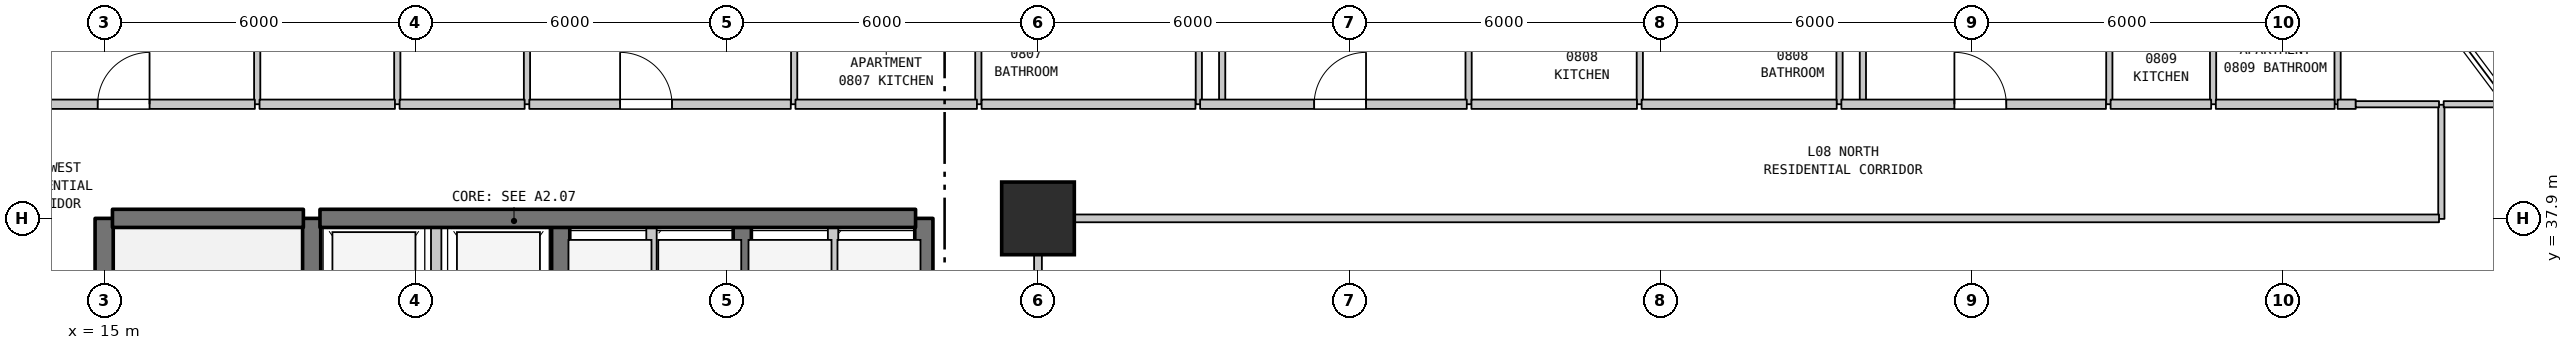
"""IFC4 building model, lengths in metres.
Left out: names, types, materials, properties, quantities, classifications, styles, units other than length and angle.
Written with IfcOpenShell. Run it as: python <this file> out.ifc"""

import sys

from ifc_helpers import new_model, si_unit, direction, frame, frame_2d, origin, origin_2d, place, context, subcontext, project, spatial, rectangle, extrude, element, fill, save


model = new_model("IFC4")
c1 = context("Model", 3, precision=1e-05, world=origin(), true_north=direction((0.0, 1.0)))
c2 = subcontext(c1, "Body", "Model", "MODEL_VIEW")
j1 = project(units=[si_unit("LENGTHUNIT", "METRE"), si_unit("PLANEANGLEUNIT", "RADIAN")], contexts=[c1])
p1 = place(None, origin())
s1 = spatial("IfcSite", under=j1, at=p1, CompositionType="ELEMENT")
p2 = place(p1, origin())
s2 = spatial("IfcBuilding", under=s1, at=p2, CompositionType="ELEMENT")
p3 = place(p2, frame((0.0, 0.0, 38.8)))
s3 = spatial("IfcBuildingStorey", under=s2, at=p3, CompositionType="ELEMENT", Elevation=38.8)
p4 = place(p3, frame((33.0, 37.9, 0.0), z_axis=(0.0, 0.0, 1.0), x_axis=(1.0, 0.0, 0.0)))
e1 = element("IfcColumn", 1, at=p4, inside=s3, PredefinedType="COLUMN", context=c2, shape_type="SweptSolid", body=[
    extrude(rectangle(XDim=1.4, YDim=1.4, at=origin_2d()), origin(), (0.0, 0.0, 1.0), 3.7),
])
p5 = place(p3, frame((15.0, 31.1, 0.0), z_axis=(0.0, 0.0, 1.0), x_axis=(0.0, 1.0, 0.0)))
e2 = element("IfcWall", 2, at=p5, inside=s3, PredefinedType="SHEAR", context=c2, shape_type="SweptSolid", body=[
    extrude(rectangle(XDim=6.8, YDim=0.35, at=frame_2d((3.4, 0.0))), origin(), (0.0, 0.0, 1.0), 3.385),
])
p6 = place(p3, frame((17.95, 40.1, 0.0), z_axis=(0.0, 0.0, 1.0), x_axis=(0.0, 1.0, 0.0)))
e3 = element("IfcWall", 3, at=p6, inside=s3, PredefinedType="PARTITIONING", context=c2, shape_type="SweptSolid", body=[
    extrude(rectangle(XDim=3.2, YDim=0.12, at=frame_2d((1.6, 0.0))), origin(), (0.0, 0.0, 1.0), 3.385),
])
p7 = place(p3, frame((19.0, 35.0, 0.0), z_axis=(0.0, 0.0, 1.0), x_axis=(0.0, 1.0, 0.0)))
e4 = element("IfcWall", 4, at=p7, inside=s3, PredefinedType="SHEAR", context=c2, shape_type="SweptSolid", body=[
    extrude(rectangle(XDim=2.9, YDim=0.35, at=frame_2d((1.45, 0.0))), origin(), (0.0, 0.0, 1.0), 3.385),
])
p8 = place(p3, frame((20.65, 40.1, 0.0), z_axis=(0.0, 0.0, 1.0), x_axis=(0.0, 1.0, 0.0)))
e5 = element("IfcWall", 5, at=p8, inside=s3, PredefinedType="PARTITIONING", context=c2, shape_type="SweptSolid", body=[
    extrude(rectangle(XDim=3.2, YDim=0.12, at=frame_2d((1.6, 0.0))), origin(), (0.0, 0.0, 1.0), 3.385),
])
p9 = place(p8, frame((1.15, 0.0, 0.0)))
e6 = element("IfcOpeningElement", 6, at=p9, cuts=e5, PredefinedType="OPENING", context=c2, shape_type="SweptSolid", body=[
    extrude(rectangle(XDim=0.9, YDim=2.15, at=frame_2d((0.45, 1.075))), frame((0.0, 0.07, 0.0), z_axis=(0.0, -1.0, 0.0), x_axis=(1.0, 0.0, 0.0)), (0.0, 0.0, 1.0), 0.14),
])
p10 = place(p3, frame((21.4, 35.0, 0.0), z_axis=(0.0, 0.0, 1.0), x_axis=(0.0, 1.0, 0.0)))
e7 = element("IfcWall", 7, at=p10, inside=s3, PredefinedType="STANDARD", context=c2, shape_type="SweptSolid", body=[
    extrude(rectangle(XDim=2.9, YDim=0.2, at=frame_2d((1.45, 0.0))), origin(), (0.0, 0.0, 1.0), 3.385),
])
p11 = place(p3, frame((23.15, 40.1, 0.0), z_axis=(0.0, 0.0, 1.0), x_axis=(0.0, 1.0, 0.0)))
e8 = element("IfcWall", 8, at=p11, inside=s3, PredefinedType="PARTITIONING", context=c2, shape_type="SweptSolid", body=[
    extrude(rectangle(XDim=2.05, YDim=0.12, at=frame_2d((1.025, 0.0))), origin(), (0.0, 0.0, 1.0), 3.385),
])
p12 = place(p3, frame((23.8, 35.0, 0.0), z_axis=(0.0, 0.0, 1.0), x_axis=(0.0, 1.0, 0.0)))
e9 = element("IfcWall", 9, at=p12, inside=s3, PredefinedType="SHEAR", context=c2, shape_type="SweptSolid", body=[
    extrude(rectangle(XDim=2.9, YDim=0.35, at=frame_2d((1.45, 0.0))), origin(), (0.0, 0.0, 1.0), 3.385),
])
p13 = place(p3, frame((25.55, 35.0, 0.0), z_axis=(0.0, 0.0, 1.0), x_axis=(0.0, 1.0, 0.0)))
e10 = element("IfcWall", 10, at=p13, inside=s3, PredefinedType="STANDARD", context=c2, shape_type="SweptSolid", body=[
    extrude(rectangle(XDim=2.9, YDim=0.2, at=frame_2d((1.45, 0.0))), origin(), (0.0, 0.0, 1.0), 3.385),
])
p14 = place(p3, frame((27.3, 35.0, 0.0), z_axis=(0.0, 0.0, 1.0), x_axis=(0.0, 1.0, 0.0)))
e11 = element("IfcWall", 11, at=p14, inside=s3, PredefinedType="SHEAR", context=c2, shape_type="SweptSolid", body=[
    extrude(rectangle(XDim=2.9, YDim=0.35, at=frame_2d((1.45, 0.0))), origin(), (0.0, 0.0, 1.0), 3.385),
])
p15 = place(p3, frame((28.3, 40.1, 0.0), z_axis=(0.0, 0.0, 1.0), x_axis=(0.0, 1.0, 0.0)))
e12 = element("IfcWall", 12, at=p15, inside=s3, PredefinedType="PARTITIONING", context=c2, shape_type="SweptSolid", body=[
    extrude(rectangle(XDim=2.3, YDim=0.12, at=frame_2d((1.15, 0.0))), origin(), (0.0, 0.0, 1.0), 3.385),
])
p16 = place(p3, frame((29.05, 35.0, 0.0), z_axis=(0.0, 0.0, 1.0), x_axis=(0.0, 1.0, 0.0)))
e13 = element("IfcWall", 13, at=p16, inside=s3, PredefinedType="STANDARD", context=c2, shape_type="SweptSolid", body=[
    extrude(rectangle(XDim=2.9, YDim=0.2, at=frame_2d((1.45, 0.0))), origin(), (0.0, 0.0, 1.0), 3.385),
])
p17 = place(p3, frame((30.8, 35.0, 0.0), z_axis=(0.0, 0.0, 1.0), x_axis=(0.0, 1.0, 0.0)))
e14 = element("IfcWall", 14, at=p17, inside=s3, PredefinedType="SHEAR", context=c2, shape_type="SweptSolid", body=[
    extrude(rectangle(XDim=2.9, YDim=0.35, at=frame_2d((1.45, 0.0))), origin(), (0.0, 0.0, 1.0), 3.385),
])
p18 = place(p3, frame((31.85, 40.1, 0.0), z_axis=(0.0, 0.0, 1.0), x_axis=(0.0, 1.0, 0.0)))
e15 = element("IfcWall", 15, at=p18, inside=s3, PredefinedType="PARTITIONING", context=c2, shape_type="SweptSolid", body=[
    extrude(rectangle(XDim=2.3, YDim=0.12, at=frame_2d((1.15, 0.0))), origin(), (0.0, 0.0, 1.0), 3.385),
])
p19 = place(p3, frame((33.0, 27.91, 0.0), z_axis=(0.0, 0.0, 1.0), x_axis=(0.0, 1.0, 0.0)))
e16 = element("IfcWall", 16, at=p19, inside=s3, PredefinedType="STANDARD", context=c2, shape_type="SweptSolid", body=[
    extrude(rectangle(XDim=9.98, YDim=0.15, at=frame_2d((4.99, 0.0))), origin(), (0.0, 0.0, 1.0), 2.885),
])
p20 = place(p3, frame((36.1, 40.1, 0.0), z_axis=(0.0, 0.0, 1.0), x_axis=(0.0, 1.0, 0.0)))
e17 = element("IfcWall", 17, at=p20, inside=s3, PredefinedType="PARTITIONING", context=c2, shape_type="SweptSolid", body=[
    extrude(rectangle(XDim=2.3, YDim=0.12, at=frame_2d((1.15, 0.0))), origin(), (0.0, 0.0, 1.0), 3.385),
])
p21 = place(p3, frame((36.55, 40.1, 0.0), z_axis=(0.0, 0.0, 1.0), x_axis=(0.0, 1.0, 0.0)))
e18 = element("IfcWall", 18, at=p21, inside=s3, PredefinedType="PARTITIONING", context=c2, shape_type="SweptSolid", body=[
    extrude(rectangle(XDim=13.79, YDim=0.12, at=frame_2d((6.895, 0.0))), origin(), (0.0, 0.0, 1.0), 3.385),
])
for number, where, z_axis, x_axis in (
    (19, (41.3, 40.1, 0.0), (0.0, 0.0, 1.0), (0.0, 1.0, 0.0)),
    (20, (44.6, 40.1, 0.0), (0.0, 0.0, 1.0), (0.0, 1.0, 0.0)),
    (21, (48.45, 40.1, 0.0), (0.0, 0.0, 1.0), (0.0, 1.0, 0.0)),
):
    element("IfcWall", number, at=place(p3, frame(where, z_axis=z_axis, x_axis=x_axis)), inside=s3, PredefinedType="PARTITIONING", context=c2, shape_type="SweptSolid", body=[
        extrude(rectangle(XDim=2.3, YDim=0.12, at=frame_2d((1.15, 0.0))), origin(), (0.0, 0.0, 1.0), 3.385),
    ])
p22 = place(p3, frame((48.9, 40.1, 0.0), z_axis=(0.0, 0.0, 1.0), x_axis=(0.0, 1.0, 0.0)))
e22 = element("IfcWall", 22, at=p22, inside=s3, PredefinedType="PARTITIONING", context=c2, shape_type="SweptSolid", body=[
    extrude(rectangle(XDim=13.79, YDim=0.12, at=frame_2d((6.895, 0.0))), origin(), (0.0, 0.0, 1.0), 3.385),
])
for number, where, z_axis, x_axis in (
    (23, (53.65, 40.1, 0.0), (0.0, 0.0, 1.0), (0.0, 1.0, 0.0)),
    (24, (55.65, 40.1, 0.0), (0.0, 0.0, 1.0), (0.0, 1.0, 0.0)),
    (25, (58.05, 40.1, 0.0), (0.0, 0.0, 1.0), (0.0, 1.0, 0.0)),
):
    element("IfcWall", number, at=place(p3, frame(where, z_axis=z_axis, x_axis=x_axis)), inside=s3, PredefinedType="PARTITIONING", context=c2, shape_type="SweptSolid", body=[
        extrude(rectangle(XDim=2.3, YDim=0.12, at=frame_2d((1.15, 0.0))), origin(), (0.0, 0.0, 1.0), 3.385),
    ])
p23 = place(p3, frame((60.05, 37.89, 0.0), z_axis=(0.0, 0.0, 1.0), x_axis=(0.0, 1.0, 0.0)))
e26 = element("IfcWall", 26, at=p23, inside=s3, PredefinedType="PARTITIONING", context=c2, shape_type="SweptSolid", body=[
    extrude(rectangle(XDim=2.2, YDim=0.12, at=frame_2d((1.1, 0.0))), origin(), (0.0, 0.0, 1.0), 3.385),
])
p24 = place(p3, frame((15.16, 37.9, 0.0), z_axis=(0.0, 0.0, 1.0), x_axis=(1.0, 0.0, 0.0)))
e27 = element("IfcWall", 27, at=p24, inside=s3, PredefinedType="SHEAR", context=c2, shape_type="SweptSolid", body=[
    extrude(rectangle(XDim=3.68, YDim=0.35, at=frame_2d((1.84, 0.0))), origin(), (0.0, 0.0, 1.0), 3.385),
])
p25 = place(p3, frame((19.16, 37.9, 0.0), z_axis=(0.0, 0.0, 1.0), x_axis=(1.0, 0.0, 0.0)))
e28 = element("IfcWall", 28, at=p25, inside=s3, PredefinedType="SHEAR", context=c2, shape_type="SweptSolid", body=[
    extrude(rectangle(XDim=11.48, YDim=0.35, at=frame_2d((5.74, 0.0))), origin(), (0.0, 0.0, 1.0), 3.385),
])
p26 = place(p3, frame((33.07, 37.9, 0.0), z_axis=(0.0, 0.0, 1.0), x_axis=(1.0, 0.0, 0.0)))
e29 = element("IfcWall", 29, at=p26, inside=s3, PredefinedType="STANDARD", context=c2, shape_type="SweptSolid", body=[
    extrude(rectangle(XDim=26.935, YDim=0.15, at=frame_2d((13.467, 0.0))), origin(), (0.0, 0.0, 1.0), 3.385),
])
p27 = place(p3, frame((12.875, 40.1, 0.0), z_axis=(0.0, 0.0, 1.0), x_axis=(1.0, 0.0, 0.0)))
e30 = element("IfcWall", 30, at=p27, inside=s3, PredefinedType="STANDARD", context=c2, shape_type="SweptSolid", body=[
    extrude(rectangle(XDim=5.03, YDim=0.18, at=frame_2d((2.515, 0.0))), origin(), (0.0, 0.0, 1.0), 3.385),
])
p28 = place(p27, frame((2.0, 0.0, 0.0)))
e31 = element("IfcOpeningElement", 31, at=p28, cuts=e30, PredefinedType="OPENING", context=c2, shape_type="SweptSolid", body=[
    extrude(rectangle(XDim=1.0, YDim=2.15, at=frame_2d((0.5, 1.075))), frame((0.0, 0.1, 0.0), z_axis=(0.0, -1.0, 0.0), x_axis=(1.0, 0.0, 0.0)), (0.0, 0.0, 1.0), 0.2),
])
p29 = place(p3, frame((17.995, 40.1, 0.0), z_axis=(0.0, 0.0, 1.0), x_axis=(1.0, 0.0, 0.0)))
e32 = element("IfcWall", 32, at=p29, inside=s3, PredefinedType="STANDARD", context=c2, shape_type="SweptSolid", body=[
    extrude(rectangle(XDim=2.61, YDim=0.18, at=frame_2d((1.305, 0.0))), origin(), (0.0, 0.0, 1.0), 3.385),
])
p30 = place(p3, frame((20.695, 40.1, 0.0), z_axis=(0.0, 0.0, 1.0), x_axis=(1.0, 0.0, 0.0)))
e33 = element("IfcWall", 33, at=p30, inside=s3, PredefinedType="STANDARD", context=c2, shape_type="SweptSolid", body=[
    extrude(rectangle(XDim=2.41, YDim=0.18, at=frame_2d((1.205, 0.0))), origin(), (0.0, 0.0, 1.0), 3.385),
])
p31 = place(p3, frame((23.195, 40.1, 0.0), z_axis=(0.0, 0.0, 1.0), x_axis=(1.0, 0.0, 0.0)))
e34 = element("IfcWall", 34, at=p31, inside=s3, PredefinedType="STANDARD", context=c2, shape_type="SweptSolid", body=[
    extrude(rectangle(XDim=5.04, YDim=0.18, at=frame_2d((2.52, 0.0))), origin(), (0.0, 0.0, 1.0), 3.385),
])
p32 = place(p31, frame((1.75, 0.0, 0.0)))
e35 = element("IfcOpeningElement", 35, at=p32, cuts=e34, PredefinedType="OPENING", context=c2, shape_type="SweptSolid", body=[
    extrude(rectangle(XDim=1.0, YDim=2.15, at=frame_2d((0.5, 1.075))), frame((0.0, 0.1, 0.0), z_axis=(0.0, -1.0, 0.0), x_axis=(1.0, 0.0, 0.0)), (0.0, 0.0, 1.0), 0.2),
])
p33 = place(p3, frame((28.325, 40.1, 0.0), z_axis=(0.0, 0.0, 1.0), x_axis=(1.0, 0.0, 0.0)))
e36 = element("IfcWall", 36, at=p33, inside=s3, PredefinedType="STANDARD", context=c2, shape_type="SweptSolid", body=[
    extrude(rectangle(XDim=3.498, YDim=0.18, at=frame_2d((1.749, 0.0))), origin(), (0.0, 0.0, 1.0), 3.385),
])
p34 = place(p3, frame((31.913, 40.1, 0.0), z_axis=(0.0, 0.0, 1.0), x_axis=(1.0, 0.0, 0.0)))
e37 = element("IfcWall", 37, at=p34, inside=s3, PredefinedType="STANDARD", context=c2, shape_type="SweptSolid", body=[
    extrude(rectangle(XDim=4.122, YDim=0.18, at=frame_2d((2.061, 0.0))), origin(), (0.0, 0.0, 1.0), 3.385),
])
p35 = place(p3, frame((36.125, 40.1, 0.0), z_axis=(0.0, 0.0, 1.0), x_axis=(1.0, 0.0, 0.0)))
e38 = element("IfcWall", 38, at=p35, inside=s3, PredefinedType="STANDARD", context=c2, shape_type="SweptSolid", body=[
    extrude(rectangle(XDim=5.14, YDim=0.18, at=frame_2d((2.57, 0.0))), origin(), (0.0, 0.0, 1.0), 3.385),
])
p36 = place(p35, frame((2.198, 0.0, 0.0)))
e39 = element("IfcOpeningElement", 39, at=p36, cuts=e38, PredefinedType="OPENING", context=c2, shape_type="SweptSolid", body=[
    extrude(rectangle(XDim=1.0, YDim=2.15, at=frame_2d((0.5, 1.075))), frame((0.0, 0.1, 0.0), z_axis=(0.0, -1.0, 0.0), x_axis=(1.0, 0.0, 0.0)), (0.0, 0.0, 1.0), 0.2),
])
p37 = place(p3, frame((41.355, 40.1, 0.0), z_axis=(0.0, 0.0, 1.0), x_axis=(1.0, 0.0, 0.0)))
e40 = element("IfcWall", 40, at=p37, inside=s3, PredefinedType="STANDARD", context=c2, shape_type="SweptSolid", body=[
    extrude(rectangle(XDim=3.19, YDim=0.18, at=frame_2d((1.595, 0.0))), origin(), (0.0, 0.0, 1.0), 3.385),
])
p38 = place(p3, frame((44.635, 40.1, 0.0), z_axis=(0.0, 0.0, 1.0), x_axis=(1.0, 0.0, 0.0)))
e41 = element("IfcWall", 41, at=p38, inside=s3, PredefinedType="STANDARD", context=c2, shape_type="SweptSolid", body=[
    extrude(rectangle(XDim=3.76, YDim=0.18, at=frame_2d((1.88, 0.0))), origin(), (0.0, 0.0, 1.0), 3.385),
])
p39 = place(p3, frame((48.485, 40.1, 0.0), z_axis=(0.0, 0.0, 1.0), x_axis=(1.0, 0.0, 0.0)))
e42 = element("IfcWall", 42, at=p39, inside=s3, PredefinedType="STANDARD", context=c2, shape_type="SweptSolid", body=[
    extrude(rectangle(XDim=5.1, YDim=0.18, at=frame_2d((2.55, 0.0))), origin(), (0.0, 0.0, 1.0), 3.385),
])
p40 = place(p39, frame((2.179, 0.0, 0.0)))
e43 = element("IfcOpeningElement", 43, at=p40, cuts=e42, PredefinedType="OPENING", context=c2, shape_type="SweptSolid", body=[
    extrude(rectangle(XDim=1.0, YDim=2.15, at=frame_2d((0.5, 1.075))), frame((0.0, 0.1, 0.0), z_axis=(0.0, -1.0, 0.0), x_axis=(1.0, 0.0, 0.0)), (0.0, 0.0, 1.0), 0.2),
])
p41 = place(p3, frame((53.675, 40.1, 0.0), z_axis=(0.0, 0.0, 1.0), x_axis=(1.0, 0.0, 0.0)))
e44 = element("IfcWall", 44, at=p41, inside=s3, PredefinedType="STANDARD", context=c2, shape_type="SweptSolid", body=[
    extrude(rectangle(XDim=1.938, YDim=0.18, at=frame_2d((0.969, 0.0))), origin(), (0.0, 0.0, 1.0), 3.385),
])
p42 = place(p3, frame((55.703, 40.1, 0.0), z_axis=(0.0, 0.0, 1.0), x_axis=(1.0, 0.0, 0.0)))
e45 = element("IfcWall", 45, at=p42, inside=s3, PredefinedType="STANDARD", context=c2, shape_type="SweptSolid", body=[
    extrude(rectangle(XDim=2.29, YDim=0.18, at=frame_2d((1.145, 0.0))), origin(), (0.0, 0.0, 1.0), 3.385),
])
p43 = place(p3, frame((58.05, 40.1, 0.0), z_axis=(0.0, 0.0, 1.0), x_axis=(1.0, 0.0, 0.0)))
e46 = element("IfcWall", 46, at=p43, inside=s3, PredefinedType="STANDARD", context=c2, shape_type="SweptSolid", body=[
    extrude(rectangle(XDim=0.35, YDim=0.18, at=frame_2d((0.175, 0.0))), origin(), (0.0, 0.0, 1.0), 3.385),
])
p44 = place(p3, frame((58.4, 40.1, 0.0), z_axis=(0.0, 0.0, 1.0), x_axis=(1.0, 0.0, 0.0)))
e47 = element("IfcWall", 47, at=p44, inside=s3, PredefinedType="PARTITIONING", context=c2, shape_type="SweptSolid", body=[
    extrude(rectangle(XDim=1.605, YDim=0.12, at=frame_2d((0.802, 0.0))), origin(), (0.0, 0.0, 1.0), 3.385),
])
p45 = place(p3, frame((60.095, 40.1, 0.0), z_axis=(0.0, 0.0, 1.0), x_axis=(1.0, 0.0, 0.0)))
e48 = element("IfcWall", 48, at=p45, inside=s3, PredefinedType="PARTITIONING", context=c2, shape_type="SweptSolid", body=[
    extrude(rectangle(XDim=1.245, YDim=0.12, at=frame_2d((0.623, 0.0))), origin(), (0.0, 0.0, 1.0), 3.385),
])
p46 = place(p28, origin())
e49 = element("IfcDoor", 49, at=p46, inside=s3, OperationType="SINGLE_SWING_RIGHT", PredefinedType="DOOR", context=c2, shape_type="SweptSolid", body=[
    extrude(rectangle(XDim=1.0, YDim=2.15, at=frame_2d((0.5, 1.075))), frame((0.0, 0.025, 0.0), z_axis=(0.0, -1.0, 0.0), x_axis=(1.0, 0.0, 0.0)), (0.0, 0.0, 1.0), 0.05),
])
fill(e31, e49)
p47 = place(p32, origin())
e50 = element("IfcDoor", 50, at=p47, inside=s3, OperationType="SINGLE_SWING_LEFT", PredefinedType="DOOR", context=c2, shape_type="SweptSolid", body=[
    extrude(rectangle(XDim=1.0, YDim=2.15, at=frame_2d((0.5, 1.075))), frame((0.0, 0.025, 0.0), z_axis=(0.0, -1.0, 0.0), x_axis=(1.0, 0.0, 0.0)), (0.0, 0.0, 1.0), 0.05),
])
fill(e35, e50)
p48 = place(p36, origin())
e51 = element("IfcDoor", 51, at=p48, inside=s3, OperationType="SINGLE_SWING_RIGHT", PredefinedType="DOOR", context=c2, shape_type="SweptSolid", body=[
    extrude(rectangle(XDim=1.0, YDim=2.15, at=frame_2d((0.5, 1.075))), frame((0.0, 0.025, 0.0), z_axis=(0.0, -1.0, 0.0), x_axis=(1.0, 0.0, 0.0)), (0.0, 0.0, 1.0), 0.05),
])
fill(e39, e51)
p49 = place(p40, origin())
e52 = element("IfcDoor", 52, at=p49, inside=s3, OperationType="SINGLE_SWING_LEFT", PredefinedType="DOOR", context=c2, shape_type="SweptSolid", body=[
    extrude(rectangle(XDim=1.0, YDim=2.15, at=frame_2d((0.5, 1.075))), frame((0.0, 0.025, 0.0), z_axis=(0.0, -1.0, 0.0), x_axis=(1.0, 0.0, 0.0)), (0.0, 0.0, 1.0), 0.05),
])
fill(e43, e52)
save(model, sys.argv[1])
